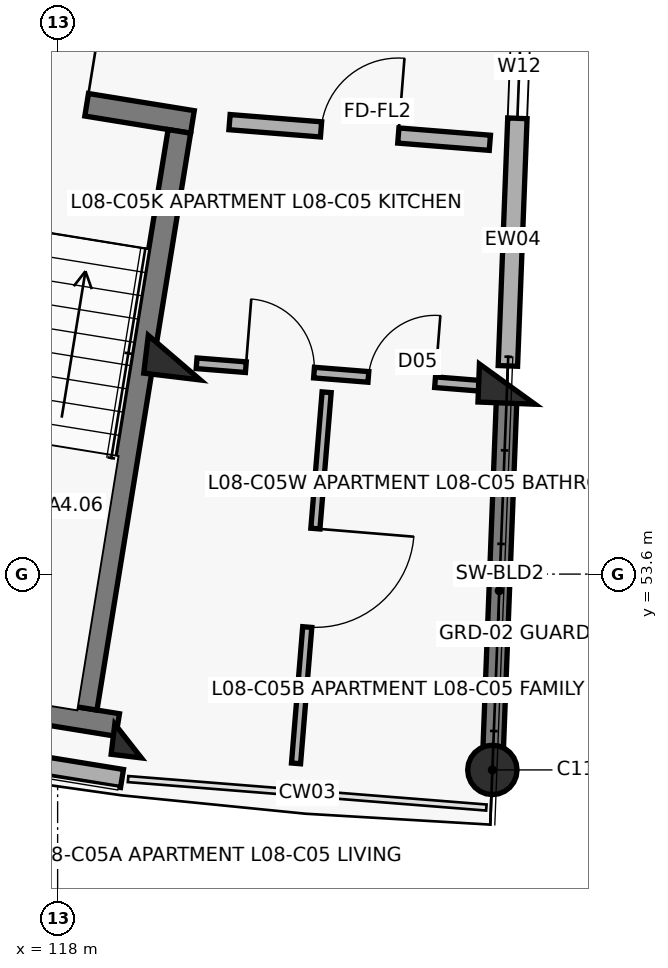
"""IFC4 building model, lengths in metres.
Left out: names, types, materials, properties, quantities, classifications, styles, units other than length and angle.
Written with IfcOpenShell. Run it as: python <this file> out.ifc"""

import sys

from ifc_helpers import new_model, si_unit, direction, frame, frame_2d, origin, origin_2d, place, context, subcontext, project, spatial, rectangle, circle, extrude, element, fill, save


model = new_model("IFC4")
c1 = context("Model", 3, precision=1e-05, world=origin(), true_north=direction((0.0, 1.0)))
c2 = subcontext(c1, "Body", "Model", "MODEL_VIEW")
j1 = project(units=[si_unit("LENGTHUNIT", "METRE"), si_unit("PLANEANGLEUNIT", "RADIAN")], contexts=[c1])
p1 = place(None, origin())
s1 = spatial("IfcSite", under=j1, at=p1, CompositionType="ELEMENT")
p2 = place(p1, origin())
s2 = spatial("IfcBuilding", under=s1, at=p2, CompositionType="ELEMENT")
p3 = place(p2, frame((0.0, 0.0, 26.7)))
s3 = spatial("IfcBuildingStorey", under=s2, at=p3, CompositionType="ELEMENT", Elevation=26.7)
p4 = place(p3, frame((119.535, 56.448, 0.0), z_axis=(0.0, 0.0, 1.0), x_axis=(-0.119790293837, -0.992799217114, 0.0)))
e1 = element("IfcColumn", 1, at=p4, inside=s3, PredefinedType="COLUMN", context=c2, shape_type="SweptSolid", body=[
    extrude(rectangle(XDim=0.5, YDim=0.75, at=origin_2d()), origin(), (0.0, 0.0, 1.0), 3.1),
])
p5 = place(p3, frame((118.927, 51.404, 0.0), z_axis=(0.0, 0.0, 1.0), x_axis=(-0.119790293837, -0.992799217114, 0.0)))
e2 = element("IfcColumn", 2, at=p5, inside=s3, PredefinedType="COLUMN", context=c2, shape_type="SweptSolid", body=[
    extrude(rectangle(XDim=0.4, YDim=0.4, at=origin_2d()), origin(), (0.0, 0.0, 1.0), 3.1),
])
p6 = place(p3, frame((123.915, 56.1, 0.0), z_axis=(0.0, 0.0, 1.0), x_axis=(-0.038387809088, -0.999262916411, 0.0)))
e3 = element("IfcColumn", 3, at=p6, inside=s3, PredefinedType="COLUMN", context=c2, shape_type="SweptSolid", body=[
    extrude(rectangle(XDim=0.5, YDim=0.75, at=origin_2d()), origin(), (0.0, 0.0, 1.0), 3.1),
])
p7 = place(p3, frame((123.72, 51.023, 0.0), z_axis=(0.0, 0.0, 1.0), x_axis=(-0.038387809088, -0.999262916411, 0.0)))
e4 = element("IfcColumn", 4, at=p7, inside=s3, PredefinedType="COLUMN", context=c2, shape_type="SweptSolid", body=[
    extrude(circle(Radius=0.325, at=origin_2d()), origin(), (0.0, 0.0, 1.0), 3.1),
])
p8 = place(p3, frame((123.908, 55.92, 0.0), z_axis=(0.0, 0.0, 1.0), x_axis=(-0.038381471406, -0.99926315986, 0.0)))
e5 = element("IfcWall", 5, at=p8, inside=s3, PredefinedType="SHEAR", context=c2, shape_type="SweptSolid", body=[
    extrude(rectangle(XDim=4.72, YDim=0.27, at=frame_2d((2.36, 0.0))), origin(), (0.0, 0.0, 1.0), 2.86),
])
p9 = place(p3, frame((114.1, 51.681, 0.0), z_axis=(0.0, 0.0, 1.0), x_axis=(0.987080750493, -0.160223568819, 0.0)))
e6 = element("IfcWall", 6, at=p9, inside=s3, PredefinedType="SOLIDWALL", context=c2, shape_type="SweptSolid", body=[
    extrude(rectangle(XDim=4.809, YDim=0.24, at=frame_2d((2.404, 0.0))), origin(), (0.0, 0.0, 1.0), 2.25),
])
p10 = place(p3, frame((124.131, 61.736, 0.0), z_axis=(0.0, 0.0, 1.0), x_axis=(-0.038429649442, -0.999261308189, 0.0)))
e7 = element("IfcWall", 7, at=p10, inside=s3, PredefinedType="SOLIDWALL", context=c2, shape_type="SweptSolid", body=[
    extrude(rectangle(XDim=5.4, YDim=0.255, at=frame_2d((2.7, 0.0))), origin(), (0.0, 0.0, 1.0), 2.18),
])
p11 = place(p10, frame((0.79, 0.0, 0.75)))
e8 = element("IfcOpeningElement", 8, at=p11, cuts=e7, PredefinedType="OPENING", context=c2, shape_type="SweptSolid", body=[
    extrude(rectangle(XDim=1.35, YDim=1.35, at=frame_2d((0.675, 0.675))), frame((0.0, 0.137, 0.0), z_axis=(0.0, -1.0, 0.0), x_axis=(1.0, 0.0, 0.0)), (0.0, 0.0, 1.0), 0.275),
])
p12 = place(p3, frame((115.954, 60.169, 0.0), z_axis=(0.0, 0.0, 1.0), x_axis=(0.987077443397, -0.160243941341, 0.0)))
e9 = element("IfcWall", 9, at=p12, inside=s3, PredefinedType="SHEAR", context=c2, shape_type="SweptSolid", body=[
    extrude(rectangle(XDim=3.87, YDim=0.3, at=frame_2d((1.935, 0.0))), origin(), (0.0, 0.0, 1.0), 3.1),
])
p13 = place(p12, frame((1.41, 0.0, 0.0)))
e10 = element("IfcOpeningElement", 10, at=p13, cuts=e9, PredefinedType="OPENING", context=c2, shape_type="SweptSolid", body=[
    extrude(rectangle(XDim=1.05, YDim=2.15, at=frame_2d((0.525, 1.075))), frame((0.0, 0.16, 0.0), z_axis=(0.0, -1.0, 0.0), x_axis=(1.0, 0.0, 0.0)), (0.0, 0.0, 1.0), 0.32),
])
p14 = place(p3, frame((114.377, 52.331, 0.0), z_axis=(0.0, 0.0, 1.0), x_axis=(0.987077474317, -0.16024375088, 0.0)))
e11 = element("IfcWall", 11, at=p14, inside=s3, PredefinedType="SHEAR", context=c2, shape_type="SweptSolid", body=[
    extrude(rectangle(XDim=4.47, YDim=0.3, at=frame_2d((2.235, 0.0))), origin(), (0.0, 0.0, 1.0), 3.1),
])
p15 = place(p3, frame((119.602, 59.425, 0.0), z_axis=(0.0, 0.0, 1.0), x_axis=(-0.160201584773, -0.987084318706, 0.0)))
e12 = element("IfcWall", 12, at=p15, inside=s3, PredefinedType="SHEAR", context=c2, shape_type="SweptSolid", body=[
    extrude(rectangle(XDim=7.69, YDim=0.3, at=frame_2d((3.845, 0.0))), origin(), (0.0, 0.0, 1.0), 3.1),
])
p16 = place(p3, frame((120.261, 59.547, 0.0), z_axis=(0.0, 0.0, 1.0), x_axis=(0.996862545573, -0.079152165058, 0.0)))
e13 = element("IfcWall", 13, at=p16, inside=s3, PredefinedType="SOLIDWALL", context=c2, shape_type="SweptSolid", body=[
    extrude(rectangle(XDim=3.436, YDim=0.2, at=frame_2d((1.718, 0.0))), origin(), (0.0, 0.0, 1.0), 2.08),
])
p17 = place(p16, frame((1.208, 0.0, 0.0)))
e14 = element("IfcOpeningElement", 14, at=p17, cuts=e13, PredefinedType="OPENING", context=c2, shape_type="SweptSolid", body=[
    extrude(rectangle(XDim=1.02, YDim=2.15, at=frame_2d((0.51, 1.075))), frame((0.0, 0.11, 0.0), z_axis=(0.0, -1.0, 0.0), x_axis=(1.0, 0.0, 0.0)), (0.0, 0.0, 1.0), 0.22),
])
p18 = place(p3, frame((119.828, 56.374, 0.0), z_axis=(0.0, 0.0, 1.0), x_axis=(0.996863138536, -0.079144696778, 0.0)))
e15 = element("IfcWall", 15, at=p18, inside=s3, PredefinedType="PARTITIONING", context=c2, shape_type="SweptSolid", body=[
    extrude(rectangle(XDim=3.797, YDim=0.14, at=frame_2d((1.899, 0.0))), origin(), (0.0, 0.0, 1.0), 2.08),
])
p19 = place(p18, frame((0.65, 0.0, 0.0)))
e16 = element("IfcOpeningElement", 16, at=p19, cuts=e15, PredefinedType="OPENING", context=c2, shape_type="SweptSolid", body=[
    extrude(rectangle(XDim=0.9, YDim=2.1, at=frame_2d((0.45, 1.05))), frame((0.0, 0.08, 0.0), z_axis=(0.0, -1.0, 0.0), x_axis=(1.0, 0.0, 0.0)), (0.0, 0.0, 1.0), 0.16),
])
p20 = place(p18, frame((2.267, 0.0, 0.0)))
e17 = element("IfcOpeningElement", 17, at=p20, cuts=e15, PredefinedType="OPENING", context=c2, shape_type="SweptSolid", body=[
    extrude(rectangle(XDim=0.88, YDim=2.1, at=frame_2d((0.44, 1.05))), frame((0.0, 0.08, 0.0), z_axis=(0.0, -1.0, 0.0), x_axis=(1.0, 0.0, 0.0)), (0.0, 0.0, 1.0), 0.16),
])
p21 = place(p3, frame((121.539, 55.993, 0.0), z_axis=(0.0, 0.0, 1.0), x_axis=(-0.082163012317, -0.996618903798, 0.0)))
e18 = element("IfcWall", 18, at=p21, inside=s3, PredefinedType="PARTITIONING", context=c2, shape_type="SweptSolid", body=[
    extrude(rectangle(XDim=4.9, YDim=0.12, at=frame_2d((2.45, 0.0))), origin(), (0.0, 0.0, 1.0), 2.08),
])
p22 = place(p21, frame((1.8, 0.0, 0.0)))
e19 = element("IfcOpeningElement", 19, at=p22, cuts=e18, PredefinedType="OPENING", context=c2, shape_type="SweptSolid", body=[
    extrude(rectangle(XDim=1.3, YDim=2.1, at=frame_2d((0.65, 1.05))), frame((0.0, 0.07, 0.0), z_axis=(0.0, -1.0, 0.0), x_axis=(1.0, 0.0, 0.0)), (0.0, 0.0, 1.0), 0.14),
])
p23 = place(p11, origin())
e20 = element("IfcWindow", 20, at=p23, inside=s3, PartitioningType="DOUBLE_PANEL_VERTICAL", PredefinedType="WINDOW", context=c2, shape_type="SweptSolid", body=[
    extrude(rectangle(XDim=1.35, YDim=1.35, at=frame_2d((0.675, 0.675))), frame((0.0, 0.03, 0.0), z_axis=(0.0, -1.0, 0.0), x_axis=(1.0, 0.0, 0.0)), (0.0, 0.0, 1.0), 0.06),
])
fill(e8, e20)
p24 = place(p13, origin())
e21 = element("IfcDoor", 21, at=p24, inside=s3, OperationType="SINGLE_SWING_RIGHT", PredefinedType="DOOR", context=c2, shape_type="SweptSolid", body=[
    extrude(rectangle(XDim=1.05, YDim=2.15, at=frame_2d((0.525, 1.075))), frame((0.0, 0.025, 0.0), z_axis=(0.0, -1.0, 0.0), x_axis=(1.0, 0.0, 0.0)), (0.0, 0.0, 1.0), 0.05),
])
fill(e10, e21)
p25 = place(p17, origin())
e22 = element("IfcDoor", 22, at=p25, inside=s3, OperationType="SINGLE_SWING_RIGHT", PredefinedType="DOOR", context=c2, shape_type="SweptSolid", body=[
    extrude(rectangle(XDim=1.02, YDim=2.15, at=frame_2d((0.51, 1.075))), frame((0.0, 0.025, 0.0), z_axis=(0.0, -1.0, 0.0), x_axis=(1.0, 0.0, 0.0)), (0.0, 0.0, 1.0), 0.05),
])
fill(e14, e22)
p26 = place(p19, origin())
e23 = element("IfcDoor", 23, at=p26, inside=s3, OperationType="SINGLE_SWING_LEFT", PredefinedType="DOOR", context=c2, shape_type="SweptSolid", body=[
    extrude(rectangle(XDim=0.9, YDim=2.1, at=frame_2d((0.45, 1.05))), frame((0.0, 0.025, 0.0), z_axis=(0.0, -1.0, 0.0), x_axis=(1.0, 0.0, 0.0)), (0.0, 0.0, 1.0), 0.05),
])
fill(e16, e23)
p27 = place(p20, origin())
e24 = element("IfcDoor", 24, at=p27, inside=s3, OperationType="SINGLE_SWING_RIGHT", PredefinedType="DOOR", context=c2, shape_type="SweptSolid", body=[
    extrude(rectangle(XDim=0.88, YDim=2.1, at=frame_2d((0.44, 1.05))), frame((0.0, 0.025, 0.0), z_axis=(0.0, -1.0, 0.0), x_axis=(1.0, 0.0, 0.0)), (0.0, 0.0, 1.0), 0.05),
])
fill(e17, e24)
p28 = place(p22, origin())
e25 = element("IfcDoor", 25, at=p28, inside=s3, OperationType="SINGLE_SWING_LEFT", PredefinedType="DOOR", context=c2, shape_type="SweptSolid", body=[
    extrude(rectangle(XDim=1.3, YDim=2.1, at=frame_2d((0.65, 1.05))), frame((0.0, 0.025, 0.0), z_axis=(0.0, -1.0, 0.0), x_axis=(1.0, 0.0, 0.0)), (0.0, 0.0, 1.0), 0.05),
])
fill(e19, e25)
save(model, sys.argv[1])
